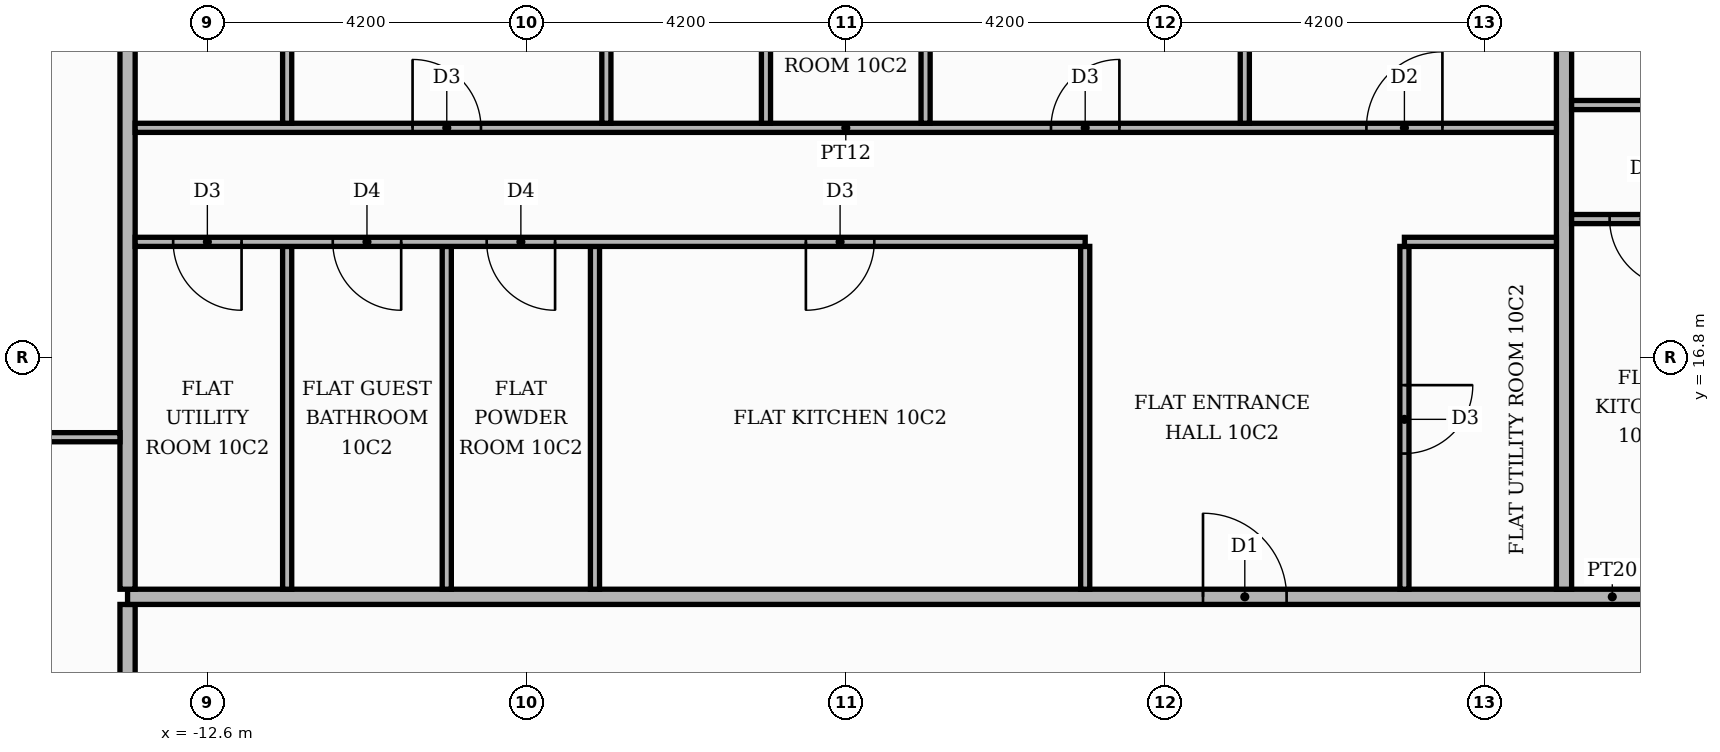
"""IFC4 building model, lengths in metres.
Left out: names, types, materials, properties, quantities, classifications, styles, units other than length and angle.
Written with IfcOpenShell. Run it as: python <this file> out.ifc"""

import sys

from ifc_helpers import new_model, si_unit, direction, frame, frame_2d, origin, place, context, subcontext, project, spatial, rectangle, extrude, element, fill, save


model = new_model("IFC4")
c1 = context("Model", 3, precision=1e-05, world=origin(), true_north=direction((0.0, 1.0)))
c2 = subcontext(c1, "Body", "Model", "MODEL_VIEW")
j1 = project(units=[si_unit("LENGTHUNIT", "METRE"), si_unit("PLANEANGLEUNIT", "RADIAN")], contexts=[c1])
p1 = place(None, origin())
s1 = spatial("IfcSite", under=j1, at=p1, CompositionType="ELEMENT")
p2 = place(p1, origin())
s2 = spatial("IfcBuilding", under=s1, at=p2, CompositionType="ELEMENT")
p3 = place(p2, frame((0.0, 0.0, 46.5)))
s3 = spatial("IfcBuildingStorey", under=s2, at=p3, CompositionType="ELEMENT", Elevation=46.5)
p4 = place(p3, frame((-13.65, -13.55, 0.0), z_axis=(0.0, 0.0, 1.0), x_axis=(0.0, 1.0, 0.0)))
e1 = element("IfcWall", 1, at=p4, inside=s3, PredefinedType="PARTITIONING", context=c2, shape_type="SweptSolid", body=[
    extrude(rectangle(XDim=27.1, YDim=0.2, at=frame_2d((13.55, 0.0))), origin(), (0.0, 0.0, 1.0), 3.48),
])
p5 = place(p4, frame((24.55, 0.0, 0.0)))
e2 = element("IfcOpeningElement", 2, at=p5, cuts=e1, PredefinedType="OPENING", context=c2, shape_type="SweptSolid", body=[
    extrude(rectangle(XDim=1.1, YDim=2.4, at=frame_2d((0.55, 1.2))), frame((0.0, 0.11, 0.0), z_axis=(0.0, -1.0, 0.0), x_axis=(1.0, 0.0, 0.0)), (0.0, 0.0, 1.0), 0.22),
])
p6 = place(p3, frame((-13.65, 13.65, 0.0), z_axis=(0.0, 0.0, 1.0), x_axis=(1.0, 0.0, 0.0)))
e3 = element("IfcWall", 3, at=p6, inside=s3, PredefinedType="PARTITIONING", context=c2, shape_type="SweptSolid", body=[
    extrude(rectangle(XDim=39.07, YDim=0.2, at=frame_2d((19.535, 0.0))), origin(), (0.0, 0.0, 1.0), 3.48),
])
p7 = place(p6, frame((24.65, 0.0, 0.0)))
e4 = element("IfcOpeningElement", 4, at=p7, cuts=e3, PredefinedType="OPENING", context=c2, shape_type="SweptSolid", body=[
    extrude(rectangle(XDim=1.1, YDim=2.4, at=frame_2d((0.55, 1.2))), frame((0.0, 0.11, 0.0), z_axis=(0.0, -1.0, 0.0), x_axis=(1.0, 0.0, 0.0)), (0.0, 0.0, 1.0), 0.22),
])
p8 = place(p6, frame((14.15, 0.0, 0.0)))
e5 = element("IfcOpeningElement", 5, at=p8, cuts=e3, PredefinedType="OPENING", context=c2, shape_type="SweptSolid", body=[
    extrude(rectangle(XDim=1.1, YDim=2.4, at=frame_2d((0.55, 1.2))), frame((0.0, 0.11, 0.0), z_axis=(0.0, -1.0, 0.0), x_axis=(1.0, 0.0, 0.0)), (0.0, 0.0, 1.0), 0.22),
])
p9 = place(p3, frame((-13.65, 13.75, 0.0), z_axis=(0.0, 0.0, 1.0), x_axis=(0.0, 1.0, 0.0)))
e6 = element("IfcWall", 6, at=p9, inside=s3, PredefinedType="PARTITIONING", context=c2, shape_type="SweptSolid", body=[
    extrude(rectangle(XDim=11.67, YDim=0.2, at=frame_2d((5.835, 0.0))), origin(), (0.0, 0.0, 1.0), 3.48),
])
for number, where, z_axis, x_axis in (
    (7, (-11.55, 13.75, 0.0), (0.0, 0.0, 1.0), (0.0, 1.0, 0.0)),
    (8, (-9.45, 13.75, 0.0), (0.0, 0.0, 1.0), (0.0, 1.0, 0.0)),
    (9, (-7.5, 13.75, 0.0), (0.0, 0.0, 1.0), (0.0, 1.0, 0.0)),
    (10, (-1.05, 13.75, 0.0), (0.0, 0.0, 1.0), (0.0, 1.0, 0.0)),
):
    element("IfcWall", number, at=place(p3, frame(where, z_axis=z_axis, x_axis=x_axis)), inside=s3, PredefinedType="PARTITIONING", context=c2, shape_type="SweptSolid", body=[
        extrude(rectangle(XDim=4.51, YDim=0.12, at=frame_2d((2.255, 0.0))), origin(), (0.0, 0.0, 1.0), 3.48),
    ])
p10 = place(p3, frame((3.15, 13.75, 0.0), z_axis=(0.0, 0.0, 1.0), x_axis=(0.0, 1.0, 0.0)))
e11 = element("IfcWall", 11, at=p10, inside=s3, PredefinedType="PARTITIONING", context=c2, shape_type="SweptSolid", body=[
    extrude(rectangle(XDim=4.51, YDim=0.12, at=frame_2d((2.255, 0.0))), origin(), (0.0, 0.0, 1.0), 3.48),
])
p11 = place(p10, frame((1.785, 0.0, 0.0)))
e12 = element("IfcOpeningElement", 12, at=p11, cuts=e11, PredefinedType="OPENING", context=c2, shape_type="SweptSolid", body=[
    extrude(rectangle(XDim=0.9, YDim=2.1, at=frame_2d((0.45, 1.05))), frame((0.0, 0.07, 0.0), z_axis=(0.0, -1.0, 0.0), x_axis=(1.0, 0.0, 0.0)), (0.0, 0.0, 1.0), 0.14),
])
p12 = place(p3, frame((5.25, 13.75, 0.0), z_axis=(0.0, 0.0, 1.0), x_axis=(0.0, 1.0, 0.0)))
e13 = element("IfcWall", 13, at=p12, inside=s3, PredefinedType="PARTITIONING", context=c2, shape_type="SweptSolid", body=[
    extrude(rectangle(XDim=11.67, YDim=0.2, at=frame_2d((5.835, 0.0))), origin(), (0.0, 0.0, 1.0), 3.48),
])
p13 = place(p3, frame((-20.72, 15.75, 0.0), z_axis=(0.0, 0.0, 1.0), x_axis=(1.0, 0.0, 0.0)))
e14 = element("IfcWall", 14, at=p13, inside=s3, PredefinedType="PARTITIONING", context=c2, shape_type="SweptSolid", body=[
    extrude(rectangle(XDim=6.97, YDim=0.12, at=frame_2d((3.485, 0.0))), origin(), (0.0, 0.0, 1.0), 3.48),
])
p14 = place(p13, frame((3.085, 0.0, 0.0)))
e15 = element("IfcOpeningElement", 15, at=p14, cuts=e14, PredefinedType="OPENING", context=c2, shape_type="SweptSolid", body=[
    extrude(rectangle(XDim=0.9, YDim=2.1, at=frame_2d((0.45, 1.05))), frame((0.0, 0.07, 0.0), z_axis=(0.0, -1.0, 0.0), x_axis=(1.0, 0.0, 0.0)), (0.0, 0.0, 1.0), 0.14),
])
p15 = place(p3, frame((-13.55, 18.32, 0.0), z_axis=(0.0, 0.0, 1.0), x_axis=(1.0, 0.0, 0.0)))
e16 = element("IfcWall", 16, at=p15, inside=s3, PredefinedType="PARTITIONING", context=c2, shape_type="SweptSolid", body=[
    extrude(rectangle(XDim=12.5, YDim=0.12, at=frame_2d((6.25, 0.0))), origin(), (0.0, 0.0, 1.0), 3.48),
])
p16 = place(p15, frame((8.825, 0.0, 0.0)))
e17 = element("IfcOpeningElement", 17, at=p16, cuts=e16, PredefinedType="OPENING", context=c2, shape_type="SweptSolid", body=[
    extrude(rectangle(XDim=0.9, YDim=2.1, at=frame_2d((0.45, 1.05))), frame((0.0, 0.07, 0.0), z_axis=(0.0, -1.0, 0.0), x_axis=(1.0, 0.0, 0.0)), (0.0, 0.0, 1.0), 0.14),
])
p17 = place(p15, frame((4.625, 0.0, 0.0)))
e18 = element("IfcOpeningElement", 18, at=p17, cuts=e16, PredefinedType="OPENING", context=c2, shape_type="SweptSolid", body=[
    extrude(rectangle(XDim=0.9, YDim=2.1, at=frame_2d((0.45, 1.05))), frame((0.0, 0.07, 0.0), z_axis=(0.0, -1.0, 0.0), x_axis=(1.0, 0.0, 0.0)), (0.0, 0.0, 1.0), 0.14),
])
p18 = place(p15, frame((2.6, 0.0, 0.0)))
e19 = element("IfcOpeningElement", 19, at=p18, cuts=e16, PredefinedType="OPENING", context=c2, shape_type="SweptSolid", body=[
    extrude(rectangle(XDim=0.9, YDim=2.1, at=frame_2d((0.45, 1.05))), frame((0.0, 0.07, 0.0), z_axis=(0.0, -1.0, 0.0), x_axis=(1.0, 0.0, 0.0)), (0.0, 0.0, 1.0), 0.14),
])
p19 = place(p15, frame((0.5, 0.0, 0.0)))
e20 = element("IfcOpeningElement", 20, at=p19, cuts=e16, PredefinedType="OPENING", context=c2, shape_type="SweptSolid", body=[
    extrude(rectangle(XDim=0.9, YDim=2.1, at=frame_2d((0.45, 1.05))), frame((0.0, 0.07, 0.0), z_axis=(0.0, -1.0, 0.0), x_axis=(1.0, 0.0, 0.0)), (0.0, 0.0, 1.0), 0.14),
])
p20 = place(p3, frame((3.15, 18.32, 0.0), z_axis=(0.0, 0.0, 1.0), x_axis=(1.0, 0.0, 0.0)))
e21 = element("IfcWall", 21, at=p20, inside=s3, PredefinedType="PARTITIONING", context=c2, shape_type="SweptSolid", body=[
    extrude(rectangle(XDim=2.0, YDim=0.12, at=frame_2d((1.0, 0.0))), origin(), (0.0, 0.0, 1.0), 3.48),
])
p21 = place(p3, frame((5.35, 18.62, 0.0), z_axis=(0.0, 0.0, 1.0), x_axis=(1.0, 0.0, 0.0)))
e22 = element("IfcWall", 22, at=p21, inside=s3, PredefinedType="PARTITIONING", context=c2, shape_type="SweptSolid", body=[
    extrude(rectangle(XDim=4.1, YDim=0.12, at=frame_2d((2.05, 0.0))), origin(), (0.0, 0.0, 1.0), 3.48),
])
p22 = place(p21, frame((0.5, 0.0, 0.0)))
e23 = element("IfcOpeningElement", 23, at=p22, cuts=e22, PredefinedType="OPENING", context=c2, shape_type="SweptSolid", body=[
    extrude(rectangle(XDim=0.9, YDim=2.1, at=frame_2d((0.45, 1.05))), frame((0.0, 0.07, 0.0), z_axis=(0.0, -1.0, 0.0), x_axis=(1.0, 0.0, 0.0)), (0.0, 0.0, 1.0), 0.14),
])
p23 = place(p3, frame((-13.55, 19.82, 0.0), z_axis=(0.0, 0.0, 1.0), x_axis=(1.0, 0.0, 0.0)))
e24 = element("IfcWall", 24, at=p23, inside=s3, PredefinedType="PARTITIONING", context=c2, shape_type="SweptSolid", body=[
    extrude(rectangle(XDim=18.7, YDim=0.12, at=frame_2d((9.35, 0.0))), origin(), (0.0, 0.0, 1.0), 3.48),
])
p24 = place(p23, frame((16.2, 0.0, 0.0)))
e25 = element("IfcOpeningElement", 25, at=p24, cuts=e24, PredefinedType="OPENING", context=c2, shape_type="SweptSolid", body=[
    extrude(rectangle(XDim=1.0, YDim=2.1, at=frame_2d((0.5, 1.05))), frame((0.0, 0.07, 0.0), z_axis=(0.0, -1.0, 0.0), x_axis=(1.0, 0.0, 0.0)), (0.0, 0.0, 1.0), 0.14),
])
p25 = place(p23, frame((12.05, 0.0, 0.0)))
e26 = element("IfcOpeningElement", 26, at=p25, cuts=e24, PredefinedType="OPENING", context=c2, shape_type="SweptSolid", body=[
    extrude(rectangle(XDim=0.9, YDim=2.1, at=frame_2d((0.45, 1.05))), frame((0.0, 0.07, 0.0), z_axis=(0.0, -1.0, 0.0), x_axis=(1.0, 0.0, 0.0)), (0.0, 0.0, 1.0), 0.14),
])
p26 = place(p23, frame((3.65, 0.0, 0.0)))
e27 = element("IfcOpeningElement", 27, at=p26, cuts=e24, PredefinedType="OPENING", context=c2, shape_type="SweptSolid", body=[
    extrude(rectangle(XDim=0.9, YDim=2.1, at=frame_2d((0.45, 1.05))), frame((0.0, 0.07, 0.0), z_axis=(0.0, -1.0, 0.0), x_axis=(1.0, 0.0, 0.0)), (0.0, 0.0, 1.0), 0.14),
])
p27 = place(p3, frame((-11.55, 19.88, 0.0), z_axis=(0.0, 0.0, 1.0), x_axis=(0.0, 1.0, 0.0)))
e28 = element("IfcWall", 28, at=p27, inside=s3, PredefinedType="PARTITIONING", context=c2, shape_type="SweptSolid", body=[
    extrude(rectangle(XDim=5.54, YDim=0.12, at=frame_2d((2.77, 0.0))), origin(), (0.0, 0.0, 1.0), 3.48),
])
p28 = place(p27, frame((2.44, 0.0, 0.0)))
e29 = element("IfcOpeningElement", 29, at=p28, cuts=e28, PredefinedType="OPENING", context=c2, shape_type="SweptSolid", body=[
    extrude(rectangle(XDim=0.9, YDim=2.1, at=frame_2d((0.45, 1.05))), frame((0.0, 0.07, 0.0), z_axis=(0.0, -1.0, 0.0), x_axis=(1.0, 0.0, 0.0)), (0.0, 0.0, 1.0), 0.14),
])
p29 = place(p3, frame((-7.35, 19.88, 0.0), z_axis=(0.0, 0.0, 1.0), x_axis=(0.0, 1.0, 0.0)))
e30 = element("IfcWall", 30, at=p29, inside=s3, PredefinedType="PARTITIONING", context=c2, shape_type="SweptSolid", body=[
    extrude(rectangle(XDim=5.54, YDim=0.12, at=frame_2d((2.77, 0.0))), origin(), (0.0, 0.0, 1.0), 3.48),
])
p30 = place(p3, frame((-5.25, 19.88, 0.0), z_axis=(0.0, 0.0, 1.0), x_axis=(0.0, 1.0, 0.0)))
e31 = element("IfcWall", 31, at=p30, inside=s3, PredefinedType="PARTITIONING", context=c2, shape_type="SweptSolid", body=[
    extrude(rectangle(XDim=5.54, YDim=0.12, at=frame_2d((2.77, 0.0))), origin(), (0.0, 0.0, 1.0), 3.48),
])
p31 = place(p30, frame((2.44, 0.0, 0.0)))
e32 = element("IfcOpeningElement", 32, at=p31, cuts=e31, PredefinedType="OPENING", context=c2, shape_type="SweptSolid", body=[
    extrude(rectangle(XDim=0.9, YDim=2.1, at=frame_2d((0.45, 1.05))), frame((0.0, 0.07, 0.0), z_axis=(0.0, -1.0, 0.0), x_axis=(1.0, 0.0, 0.0)), (0.0, 0.0, 1.0), 0.14),
])
p32 = place(p3, frame((-3.15, 19.88, 0.0), z_axis=(0.0, 0.0, 1.0), x_axis=(0.0, 1.0, 0.0)))
e33 = element("IfcWall", 33, at=p32, inside=s3, PredefinedType="PARTITIONING", context=c2, shape_type="SweptSolid", body=[
    extrude(rectangle(XDim=5.54, YDim=0.12, at=frame_2d((2.77, 0.0))), origin(), (0.0, 0.0, 1.0), 3.48),
])
p33 = place(p32, frame((2.44, 0.0, 0.0)))
e34 = element("IfcOpeningElement", 34, at=p33, cuts=e33, PredefinedType="OPENING", context=c2, shape_type="SweptSolid", body=[
    extrude(rectangle(XDim=0.9, YDim=2.1, at=frame_2d((0.45, 1.05))), frame((0.0, 0.07, 0.0), z_axis=(0.0, -1.0, 0.0), x_axis=(1.0, 0.0, 0.0)), (0.0, 0.0, 1.0), 0.14),
])
p34 = place(p3, frame((1.05, 19.88, 0.0), z_axis=(0.0, 0.0, 1.0), x_axis=(0.0, 1.0, 0.0)))
e35 = element("IfcWall", 35, at=p34, inside=s3, PredefinedType="PARTITIONING", context=c2, shape_type="SweptSolid", body=[
    extrude(rectangle(XDim=5.54, YDim=0.12, at=frame_2d((2.77, 0.0))), origin(), (0.0, 0.0, 1.0), 3.48),
])
p35 = place(p3, frame((5.35, 20.12, 0.0), z_axis=(0.0, 0.0, 1.0), x_axis=(1.0, 0.0, 0.0)))
e36 = element("IfcWall", 36, at=p35, inside=s3, PredefinedType="PARTITIONING", context=c2, shape_type="SweptSolid", body=[
    extrude(rectangle(XDim=11.95, YDim=0.12, at=frame_2d((5.975, 0.0))), origin(), (0.0, 0.0, 1.0), 3.48),
])
p36 = place(p35, frame((8.85, 0.0, 0.0)))
e37 = element("IfcOpeningElement", 37, at=p36, cuts=e36, PredefinedType="OPENING", context=c2, shape_type="SweptSolid", body=[
    extrude(rectangle(XDim=1.0, YDim=2.1, at=frame_2d((0.5, 1.05))), frame((0.0, 0.07, 0.0), z_axis=(0.0, -1.0, 0.0), x_axis=(1.0, 0.0, 0.0)), (0.0, 0.0, 1.0), 0.14),
])
p37 = place(p35, frame((5.75, 0.0, 0.0)))
e38 = element("IfcOpeningElement", 38, at=p37, cuts=e36, PredefinedType="OPENING", context=c2, shape_type="SweptSolid", body=[
    extrude(rectangle(XDim=0.9, YDim=2.1, at=frame_2d((0.45, 1.05))), frame((0.0, 0.07, 0.0), z_axis=(0.0, -1.0, 0.0), x_axis=(1.0, 0.0, 0.0)), (0.0, 0.0, 1.0), 0.14),
])
p38 = place(p22, frame((0.9, 0.0, 0.0), z_axis=(0.0, 0.0, 1.0), x_axis=(-1.0, 0.0, 0.0)))
e39 = element("IfcDoor", 39, at=p38, inside=s3, OperationType="SINGLE_SWING_RIGHT", PredefinedType="DOOR", context=c2, shape_type="SweptSolid", body=[
    extrude(rectangle(XDim=0.9, YDim=2.1, at=frame_2d((0.45, 1.05))), frame((0.0, 0.025, 0.0), z_axis=(0.0, -1.0, 0.0), x_axis=(1.0, 0.0, 0.0)), (0.0, 0.0, 1.0), 0.05),
])
fill(e23, e39)
p39 = place(p8, origin())
e40 = element("IfcDoor", 40, at=p39, inside=s3, OperationType="SINGLE_SWING_LEFT", PredefinedType="DOOR", context=c2, shape_type="SweptSolid", body=[
    extrude(rectangle(XDim=1.1, YDim=2.4, at=frame_2d((0.55, 1.2))), frame((0.0, 0.025, 0.0), z_axis=(0.0, -1.0, 0.0), x_axis=(1.0, 0.0, 0.0)), (0.0, 0.0, 1.0), 0.05),
])
fill(e5, e40)
p40 = place(p11, frame((0.9, 0.0, 0.0), z_axis=(0.0, 0.0, 1.0), x_axis=(-1.0, 0.0, 0.0)))
e41 = element("IfcDoor", 41, at=p40, inside=s3, OperationType="SINGLE_SWING_RIGHT", PredefinedType="DOOR", context=c2, shape_type="SweptSolid", body=[
    extrude(rectangle(XDim=0.9, YDim=2.1, at=frame_2d((0.45, 1.05))), frame((0.0, 0.025, 0.0), z_axis=(0.0, -1.0, 0.0), x_axis=(1.0, 0.0, 0.0)), (0.0, 0.0, 1.0), 0.05),
])
fill(e12, e41)
p41 = place(p16, frame((0.9, 0.0, 0.0), z_axis=(0.0, 0.0, 1.0), x_axis=(-1.0, 0.0, 0.0)))
e42 = element("IfcDoor", 42, at=p41, inside=s3, OperationType="SINGLE_SWING_LEFT", PredefinedType="DOOR", context=c2, shape_type="SweptSolid", body=[
    extrude(rectangle(XDim=0.9, YDim=2.1, at=frame_2d((0.45, 1.05))), frame((0.0, 0.025, 0.0), z_axis=(0.0, -1.0, 0.0), x_axis=(1.0, 0.0, 0.0)), (0.0, 0.0, 1.0), 0.05),
])
fill(e17, e42)
p42 = place(p17, frame((0.9, 0.0, 0.0), z_axis=(0.0, 0.0, 1.0), x_axis=(-1.0, 0.0, 0.0)))
e43 = element("IfcDoor", 43, at=p42, inside=s3, OperationType="SINGLE_SWING_RIGHT", PredefinedType="DOOR", context=c2, shape_type="SweptSolid", body=[
    extrude(rectangle(XDim=0.9, YDim=2.1, at=frame_2d((0.45, 1.05))), frame((0.0, 0.025, 0.0), z_axis=(0.0, -1.0, 0.0), x_axis=(1.0, 0.0, 0.0)), (0.0, 0.0, 1.0), 0.05),
])
fill(e18, e43)
p43 = place(p18, frame((0.9, 0.0, 0.0), z_axis=(0.0, 0.0, 1.0), x_axis=(-1.0, 0.0, 0.0)))
e44 = element("IfcDoor", 44, at=p43, inside=s3, OperationType="SINGLE_SWING_RIGHT", PredefinedType="DOOR", context=c2, shape_type="SweptSolid", body=[
    extrude(rectangle(XDim=0.9, YDim=2.1, at=frame_2d((0.45, 1.05))), frame((0.0, 0.025, 0.0), z_axis=(0.0, -1.0, 0.0), x_axis=(1.0, 0.0, 0.0)), (0.0, 0.0, 1.0), 0.05),
])
fill(e19, e44)
p44 = place(p19, frame((0.9, 0.0, 0.0), z_axis=(0.0, 0.0, 1.0), x_axis=(-1.0, 0.0, 0.0)))
e45 = element("IfcDoor", 45, at=p44, inside=s3, OperationType="SINGLE_SWING_RIGHT", PredefinedType="DOOR", context=c2, shape_type="SweptSolid", body=[
    extrude(rectangle(XDim=0.9, YDim=2.1, at=frame_2d((0.45, 1.05))), frame((0.0, 0.025, 0.0), z_axis=(0.0, -1.0, 0.0), x_axis=(1.0, 0.0, 0.0)), (0.0, 0.0, 1.0), 0.05),
])
fill(e20, e45)
p45 = place(p24, origin())
e46 = element("IfcDoor", 46, at=p45, inside=s3, OperationType="SINGLE_SWING_RIGHT", PredefinedType="DOOR", context=c2, shape_type="SweptSolid", body=[
    extrude(rectangle(XDim=1.0, YDim=2.1, at=frame_2d((0.5, 1.05))), frame((0.0, 0.025, 0.0), z_axis=(0.0, -1.0, 0.0), x_axis=(1.0, 0.0, 0.0)), (0.0, 0.0, 1.0), 0.05),
])
fill(e25, e46)
p46 = place(p25, origin())
e47 = element("IfcDoor", 47, at=p46, inside=s3, OperationType="SINGLE_SWING_RIGHT", PredefinedType="DOOR", context=c2, shape_type="SweptSolid", body=[
    extrude(rectangle(XDim=0.9, YDim=2.1, at=frame_2d((0.45, 1.05))), frame((0.0, 0.025, 0.0), z_axis=(0.0, -1.0, 0.0), x_axis=(1.0, 0.0, 0.0)), (0.0, 0.0, 1.0), 0.05),
])
fill(e26, e47)
p47 = place(p26, origin())
e48 = element("IfcDoor", 48, at=p47, inside=s3, OperationType="SINGLE_SWING_LEFT", PredefinedType="DOOR", context=c2, shape_type="SweptSolid", body=[
    extrude(rectangle(XDim=0.9, YDim=2.1, at=frame_2d((0.45, 1.05))), frame((0.0, 0.025, 0.0), z_axis=(0.0, -1.0, 0.0), x_axis=(1.0, 0.0, 0.0)), (0.0, 0.0, 1.0), 0.05),
])
fill(e27, e48)
save(model, sys.argv[1])
